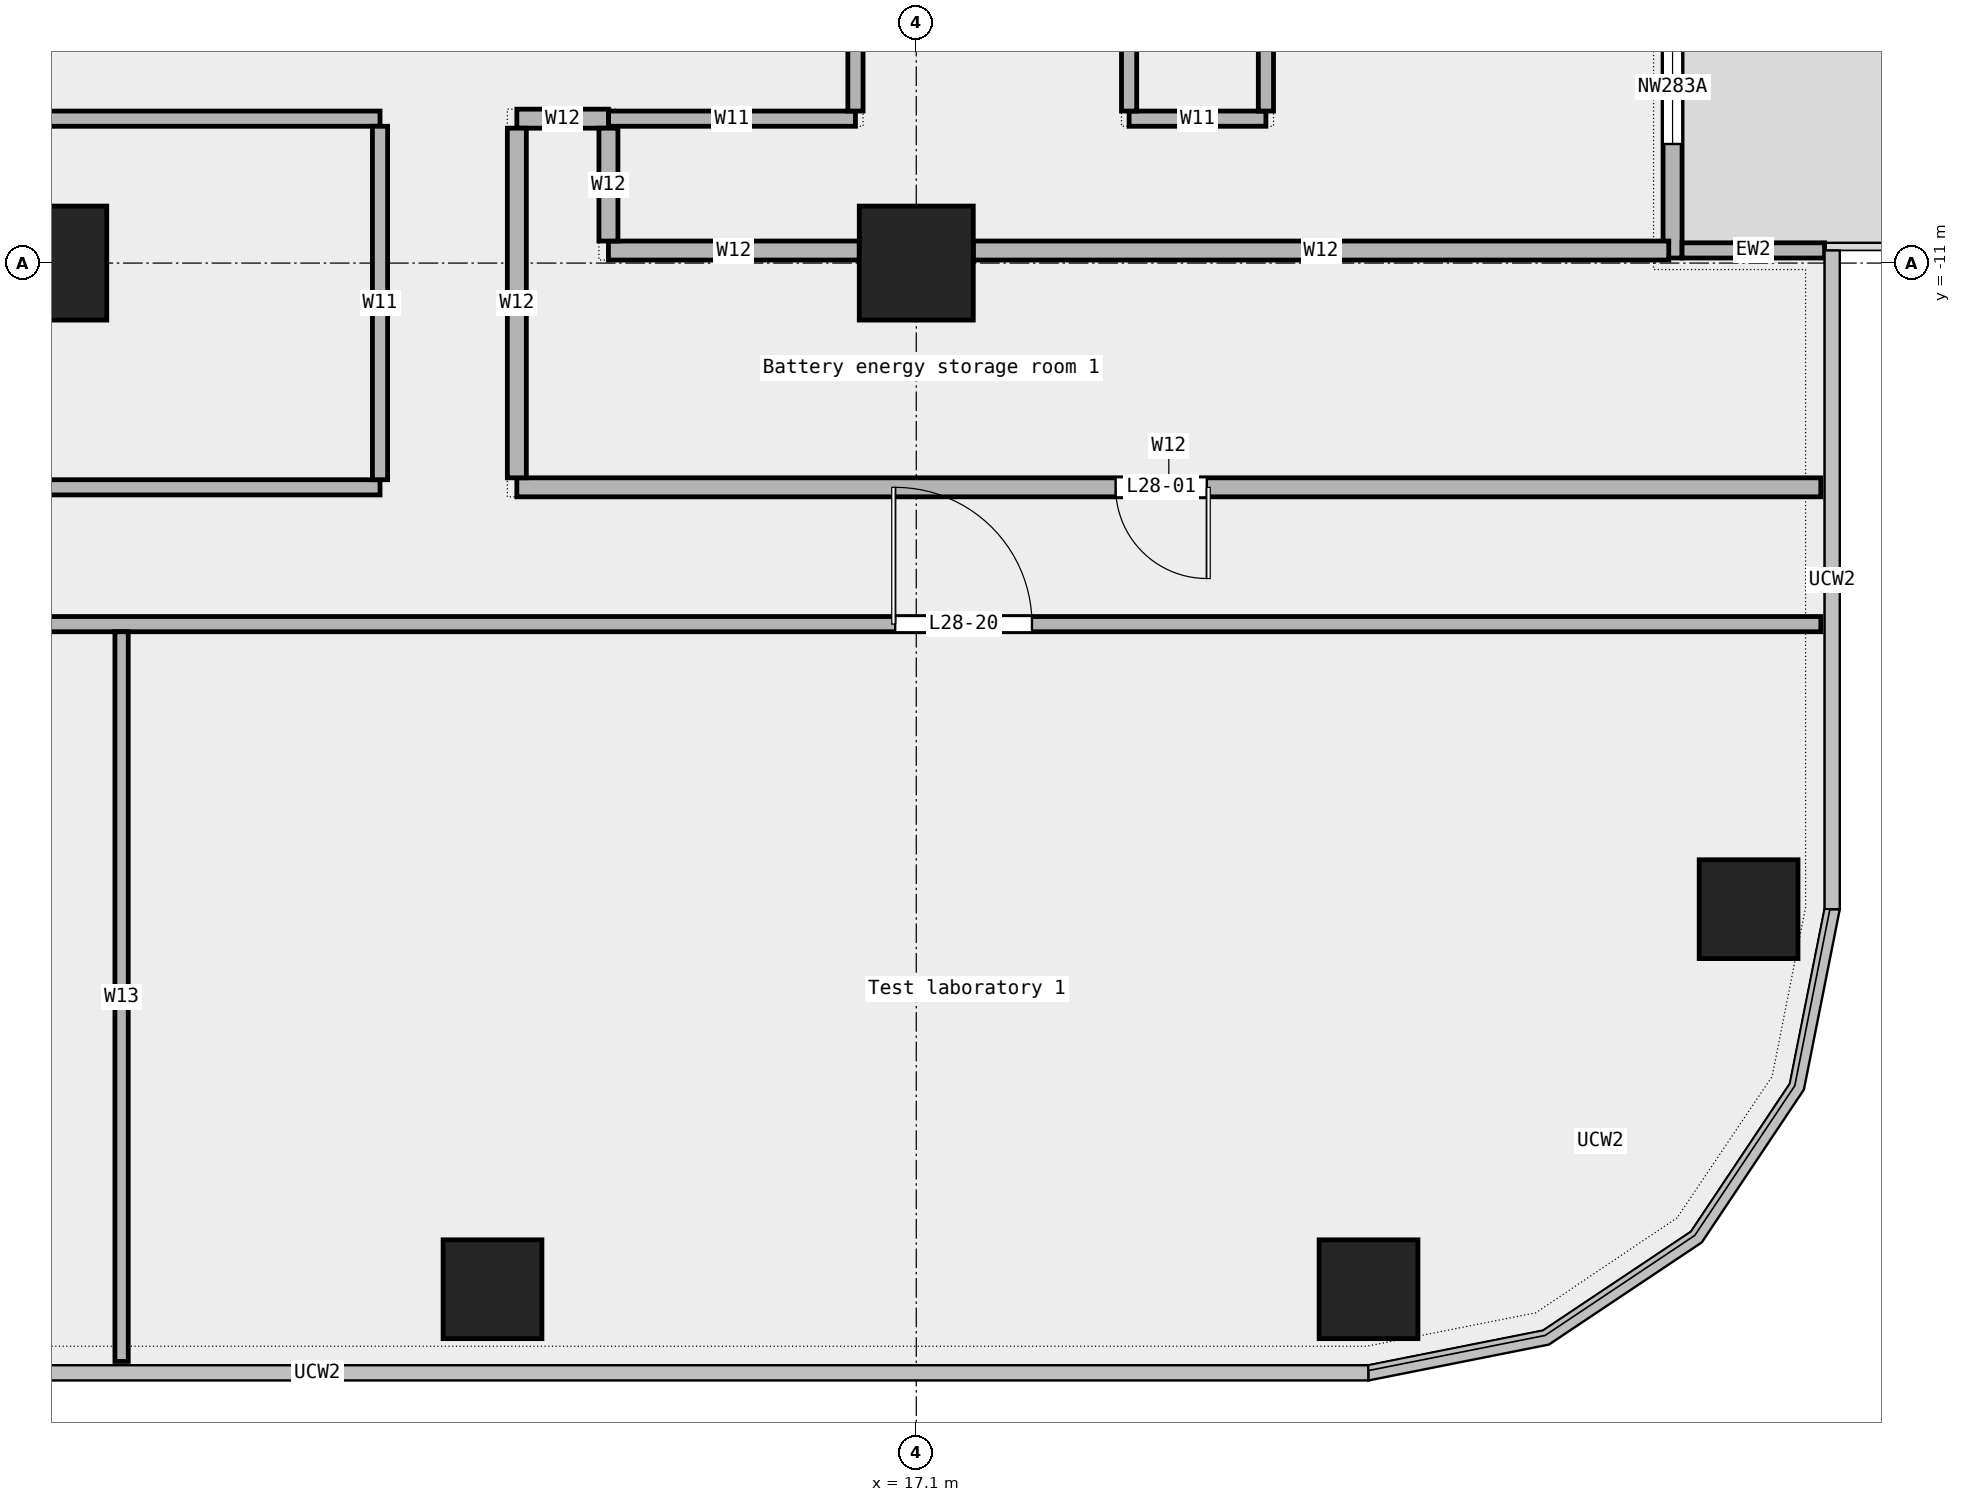
"""IFC4 building model, lengths in metres.
Left out: names, types, materials, properties, quantities, classifications, styles, units other than length and angle.
Written with IfcOpenShell. Run it as: python <this file> out.ifc"""

import sys

from ifc_helpers import new_model, si_unit, direction, frame, frame_2d, origin, origin_2d, place, context, subcontext, project, spatial, rectangle, extrude, element, fill, save


model = new_model("IFC4")
c1 = context("Model", 3, precision=1e-05, world=origin(), true_north=direction((0.0, 1.0)))
c2 = subcontext(c1, "Body", "Model", "MODEL_VIEW")
j1 = project(units=[si_unit("LENGTHUNIT", "METRE"), si_unit("PLANEANGLEUNIT", "RADIAN")], contexts=[c1])
p1 = place(None, origin())
s1 = spatial("IfcSite", under=j1, at=p1, CompositionType="ELEMENT")
p2 = place(p1, origin())
s2 = spatial("IfcBuilding", under=s1, at=p2, CompositionType="ELEMENT")
p3 = place(p2, frame((0.0, 0.0, 139.6)))
s3 = spatial("IfcBuildingStorey", under=s2, at=p3, CompositionType="ELEMENT", Elevation=139.6)
for number, where, z_axis, x_axis in (
    (1, (11.525, -24.5, 0.0), (0.0, 0.0, 1.0), (1.0, 0.0, 0.0)),
    (2, (23.05, -24.5, 0.0), (0.0, 0.0, 1.0), (1.0, 0.0, 0.0)),
    (3, (28.05, -19.5, 0.0), (0.0, 0.0, 1.0), (1.0, 0.0, 0.0)),
):
    element("IfcColumn", number, at=place(p3, frame(where, z_axis=z_axis, x_axis=x_axis)), inside=s3, PredefinedType="COLUMN", context=c2, shape_type="SweptSolid", body=[
        extrude(rectangle(XDim=1.3, YDim=1.3, at=origin_2d()), origin(), (0.0, 0.0, 1.0), 4.05),
    ])
for number, where, z_axis, x_axis in (
    (4, (5.7, -11.0, 0.0), (0.0, 0.0, 1.0), (1.0, 0.0, 0.0)),
    (5, (17.1, -11.0, 0.0), (0.0, 0.0, 1.0), (1.0, 0.0, 0.0)),
):
    element("IfcColumn", number, at=place(p3, frame(where, z_axis=z_axis, x_axis=x_axis)), inside=s3, PredefinedType="COLUMN", context=c2, shape_type="SweptSolid", body=[
        extrude(rectangle(XDim=1.5, YDim=1.5, at=origin_2d()), origin(), (0.0, 0.0, 1.0), 4.05),
    ])
p4 = place(p3, frame((27.05, -10.933, 0.0), z_axis=(0.0, 0.0, 1.0), x_axis=(0.0, 1.0, 0.0)))
e6 = element("IfcWall", 6, at=p4, inside=s3, PredefinedType="STANDARD", context=c2, shape_type="SweptSolid", body=[
    extrude(rectangle(XDim=13.2, YDim=0.25, at=frame_2d((6.6, 0.0))), origin(), (0.0, 0.0, 1.0), 4.05),
])
p5 = place(p4, frame((1.5, 0.0, 0.45)))
e7 = element("IfcOpeningElement", 7, at=p5, cuts=e6, PredefinedType="OPENING", context=c2, shape_type="SweptSolid", body=[
    extrude(rectangle(XDim=1.5, YDim=3.0, at=frame_2d((0.75, 1.5))), frame((0.0, 0.137, 0.0), z_axis=(0.0, -1.0, 0.0), x_axis=(1.0, 0.0, 0.0)), (0.0, 0.0, 1.0), 0.274),
])
p6 = place(p4, frame((5.75, 0.0, 0.0)))
e8 = element("IfcOpeningElement", 8, at=p6, cuts=e6, PredefinedType="OPENING", context=c2, shape_type="SweptSolid", body=[
    extrude(rectangle(XDim=1.8, YDim=2.4, at=frame_2d((0.9, 1.2))), frame((0.0, 0.137, 0.0), z_axis=(0.0, -1.0, 0.0), x_axis=(1.0, 0.0, 0.0)), (0.0, 0.0, 1.0), 0.274),
])
p7 = place(p4, frame((10.25, 0.0, 0.45)))
e9 = element("IfcOpeningElement", 9, at=p7, cuts=e6, PredefinedType="OPENING", context=c2, shape_type="SweptSolid", body=[
    extrude(rectangle(XDim=1.5, YDim=3.0, at=frame_2d((0.75, 1.5))), frame((0.0, 0.137, 0.0), z_axis=(0.0, -1.0, 0.0), x_axis=(1.0, 0.0, 0.0)), (0.0, 0.0, 1.0), 0.274),
])
p8 = place(p3, frame((29.05, -10.833, 0.0), z_axis=(0.0, 0.0, 1.0), x_axis=(-1.0, 0.0, 0.0)))
e10 = element("IfcWall", 10, at=p8, inside=s3, PredefinedType="STANDARD", context=c2, shape_type="SweptSolid", body=[
    extrude(rectangle(XDim=1.875, YDim=0.2, at=frame_2d((0.938, 0.0))), origin(), (0.0, 0.0, 1.0), 4.05),
])
p9 = place(p3, frame((-18.44, -15.75, 0.0), z_axis=(0.0, 0.0, 1.0), x_axis=(1.0, 0.0, 0.0)))
e11 = element("IfcWall", 11, at=p9, inside=s3, PredefinedType="PARTITIONING", context=c2, shape_type="SweptSolid", body=[
    extrude(rectangle(XDim=47.44, YDim=0.2, at=frame_2d((23.72, 0.0))), origin(), (0.0, 0.0, 1.0), 4.05),
])
p10 = place(p9, frame((18.708, 0.0, 0.0)))
e12 = element("IfcOpeningElement", 12, at=p10, cuts=e11, PredefinedType="OPENING", context=c2, shape_type="SweptSolid", body=[
    extrude(rectangle(XDim=1.5, YDim=2.1, at=frame_2d((0.75, 1.05))), frame((0.0, 0.112, 0.0), z_axis=(0.0, -1.0, 0.0), x_axis=(1.0, 0.0, 0.0)), (0.0, 0.0, 1.0), 0.224),
])
p11 = place(p9, frame((6.165, 0.0, 0.0)))
e13 = element("IfcOpeningElement", 13, at=p11, cuts=e11, PredefinedType="OPENING", context=c2, shape_type="SweptSolid", body=[
    extrude(rectangle(XDim=1.5, YDim=2.1, at=frame_2d((0.75, 1.05))), frame((0.0, 0.112, 0.0), z_axis=(0.0, -1.0, 0.0), x_axis=(1.0, 0.0, 0.0)), (0.0, 0.0, 1.0), 0.224),
])
p12 = place(p9, frame((35.262, 0.0, 0.0)))
e14 = element("IfcOpeningElement", 14, at=p12, cuts=e11, PredefinedType="OPENING", context=c2, shape_type="SweptSolid", body=[
    extrude(rectangle(XDim=1.8, YDim=2.1, at=frame_2d((0.9, 1.05))), frame((0.0, 0.112, 0.0), z_axis=(0.0, -1.0, 0.0), x_axis=(1.0, 0.0, 0.0)), (0.0, 0.0, 1.0), 0.224),
])
p13 = place(p3, frame((-2.42, -13.95, 0.0), z_axis=(0.0, 0.0, 1.0), x_axis=(1.0, 0.0, 0.0)))
e15 = element("IfcWall", 15, at=p13, inside=s3, PredefinedType="PARTITIONING", context=c2, shape_type="SweptSolid", body=[
    extrude(rectangle(XDim=12.465, YDim=0.2, at=frame_2d((6.232, 0.0))), origin(), (0.0, 0.0, 1.0), 4.05),
])
p14 = place(p3, frame((11.845, -13.95, 0.0), z_axis=(0.0, 0.0, 1.0), x_axis=(1.0, 0.0, 0.0)))
e16 = element("IfcWall", 16, at=p14, inside=s3, PredefinedType="PARTITIONING", context=c2, shape_type="SweptSolid", body=[
    extrude(rectangle(XDim=17.155, YDim=0.25, at=frame_2d((8.578, 0.0))), origin(), (0.0, 0.0, 1.0), 4.05),
])
p15 = place(p14, frame((7.877, 0.0, 0.0)))
e17 = element("IfcOpeningElement", 17, at=p15, cuts=e16, PredefinedType="OPENING", context=c2, shape_type="SweptSolid", body=[
    extrude(rectangle(XDim=1.2, YDim=2.1, at=frame_2d((0.6, 1.05))), frame((0.0, 0.137, 0.0), z_axis=(0.0, -1.0, 0.0), x_axis=(1.0, 0.0, 0.0)), (0.0, 0.0, 1.0), 0.274),
])
p16 = place(p3, frame((13.05, -10.835, 0.0), z_axis=(0.0, 0.0, 1.0), x_axis=(1.0, 0.0, 0.0)))
e18 = element("IfcWall", 18, at=p16, inside=s3, PredefinedType="PARTITIONING", context=c2, shape_type="SweptSolid", body=[
    extrude(rectangle(XDim=3.3, YDim=0.25, at=frame_2d((1.65, 0.0))), origin(), (0.0, 0.0, 1.0), 4.05),
])
p17 = place(p3, frame((17.85, -10.835, 0.0), z_axis=(0.0, 0.0, 1.0), x_axis=(1.0, 0.0, 0.0)))
e19 = element("IfcWall", 19, at=p17, inside=s3, PredefinedType="PARTITIONING", context=c2, shape_type="SweptSolid", body=[
    extrude(rectangle(XDim=9.15, YDim=0.25, at=frame_2d((4.575, 0.0))), origin(), (0.0, 0.0, 1.0), 4.05),
])
p18 = place(p3, frame((-2.42, -9.1, 0.0), z_axis=(0.0, 0.0, 1.0), x_axis=(1.0, 0.0, 0.0)))
e20 = element("IfcWall", 20, at=p18, inside=s3, PredefinedType="PARTITIONING", context=c2, shape_type="SweptSolid", body=[
    extrude(rectangle(XDim=12.465, YDim=0.2, at=frame_2d((6.232, 0.0))), origin(), (0.0, 0.0, 1.0), 4.05),
])
p19 = place(p18, frame((5.633, 0.0, 0.0)))
e21 = element("IfcOpeningElement", 21, at=p19, cuts=e20, PredefinedType="OPENING", context=c2, shape_type="SweptSolid", body=[
    extrude(rectangle(XDim=1.2, YDim=2.1, at=frame_2d((0.6, 1.05))), frame((0.0, 0.112, 0.0), z_axis=(0.0, -1.0, 0.0), x_axis=(1.0, 0.0, 0.0)), (0.0, 0.0, 1.0), 0.224),
])
p20 = place(p3, frame((13.05, -9.1, 0.0), z_axis=(0.0, 0.0, 1.0), x_axis=(1.0, 0.0, 0.0)))
e22 = element("IfcWall", 22, at=p20, inside=s3, PredefinedType="PARTITIONING", context=c2, shape_type="SweptSolid", body=[
    extrude(rectangle(XDim=3.25, YDim=0.2, at=frame_2d((1.625, 0.0))), origin(), (0.0, 0.0, 1.0), 4.05),
])
p21 = place(p3, frame((19.9, -9.1, 0.0), z_axis=(0.0, 0.0, 1.0), x_axis=(1.0, 0.0, 0.0)))
e23 = element("IfcWall", 23, at=p21, inside=s3, PredefinedType="PARTITIONING", context=c2, shape_type="SweptSolid", body=[
    extrude(rectangle(XDim=1.8, YDim=0.2, at=frame_2d((0.9, 0.0))), origin(), (0.0, 0.0, 1.0), 4.05),
])
p22 = place(p3, frame((11.845, -9.1, 0.0), z_axis=(0.0, 0.0, 1.0), x_axis=(1.0, 0.0, 0.0)))
e24 = element("IfcWall", 24, at=p22, inside=s3, PredefinedType="PARTITIONING", context=c2, shape_type="SweptSolid", body=[
    extrude(rectangle(XDim=1.205, YDim=0.25, at=frame_2d((0.603, 0.0))), origin(), (0.0, 0.0, 1.0), 4.05),
])
p23 = place(p3, frame((6.645, -25.45, 0.0), z_axis=(0.0, 0.0, 1.0), x_axis=(0.0, 1.0, 0.0)))
e25 = element("IfcWall", 25, at=p23, inside=s3, PredefinedType="PARTITIONING", context=c2, shape_type="SweptSolid", body=[
    extrude(rectangle(XDim=9.6, YDim=0.175, at=frame_2d((4.8, 0.0))), origin(), (0.0, 0.0, 1.0), 4.05),
])
p24 = place(p3, frame((10.045, -13.85, 0.0), z_axis=(0.0, 0.0, 1.0), x_axis=(0.0, 1.0, 0.0)))
e26 = element("IfcWall", 26, at=p24, inside=s3, PredefinedType="PARTITIONING", context=c2, shape_type="SweptSolid", body=[
    extrude(rectangle(XDim=4.65, YDim=0.2, at=frame_2d((2.325, 0.0))), origin(), (0.0, 0.0, 1.0), 4.05),
])
p25 = place(p3, frame((11.845, -13.825, 0.0), z_axis=(0.0, 0.0, 1.0), x_axis=(0.0, 1.0, 0.0)))
e27 = element("IfcWall", 27, at=p25, inside=s3, PredefinedType="PARTITIONING", context=c2, shape_type="SweptSolid", body=[
    extrude(rectangle(XDim=4.6, YDim=0.25, at=frame_2d((2.3, 0.0))), origin(), (0.0, 0.0, 1.0), 4.05),
])
p26 = place(p3, frame((13.05, -10.71, 0.0), z_axis=(0.0, 0.0, 1.0), x_axis=(0.0, 1.0, 0.0)))
e28 = element("IfcWall", 28, at=p26, inside=s3, PredefinedType="PARTITIONING", context=c2, shape_type="SweptSolid", body=[
    extrude(rectangle(XDim=1.485, YDim=0.25, at=frame_2d((0.742, 0.0))), origin(), (0.0, 0.0, 1.0), 4.05),
])
p27 = place(p3, frame((16.3, -9.0, 0.0), z_axis=(0.0, 0.0, 1.0), x_axis=(0.0, 1.0, 0.0)))
e29 = element("IfcWall", 29, at=p27, inside=s3, PredefinedType="PARTITIONING", context=c2, shape_type="SweptSolid", body=[
    extrude(rectangle(XDim=8.25, YDim=0.2, at=frame_2d((4.125, 0.0))), origin(), (0.0, 0.0, 1.0), 4.05),
])
p28 = place(p3, frame((19.9, -9.0, 0.0), z_axis=(0.0, 0.0, 1.0), x_axis=(0.0, 1.0, 0.0)))
e30 = element("IfcWall", 30, at=p28, inside=s3, PredefinedType="PARTITIONING", context=c2, shape_type="SweptSolid", body=[
    extrude(rectangle(XDim=9.95, YDim=0.2, at=frame_2d((4.975, 0.0))), origin(), (0.0, 0.0, 1.0), 4.05),
])
p29 = place(p3, frame((21.7, -9.0, 0.0), z_axis=(0.0, 0.0, 1.0), x_axis=(0.0, 1.0, 0.0)))
e31 = element("IfcWall", 31, at=p29, inside=s3, PredefinedType="PARTITIONING", context=c2, shape_type="SweptSolid", body=[
    extrude(rectangle(XDim=24.3, YDim=0.2, at=frame_2d((12.15, 0.0))), origin(), (0.0, 0.0, 1.0), 4.05),
])
p30 = place(p29, frame((18.645, 0.0, 0.0)))
e32 = element("IfcOpeningElement", 32, at=p30, cuts=e31, PredefinedType="OPENING", context=c2, shape_type="SweptSolid", body=[
    extrude(rectangle(XDim=1.2, YDim=2.1, at=frame_2d((0.6, 1.05))), frame((0.0, 0.112, 0.0), z_axis=(0.0, -1.0, 0.0), x_axis=(1.0, 0.0, 0.0)), (0.0, 0.0, 1.0), 0.224),
])
p31 = place(p29, frame((4.833, 0.0, 0.0)))
e33 = element("IfcOpeningElement", 33, at=p31, cuts=e31, PredefinedType="OPENING", context=c2, shape_type="SweptSolid", body=[
    extrude(rectangle(XDim=1.5, YDim=2.1, at=frame_2d((0.75, 1.05))), frame((0.0, 0.112, 0.0), z_axis=(0.0, -1.0, 0.0), x_axis=(1.0, 0.0, 0.0)), (0.0, 0.0, 1.0), 0.224),
])
p32 = place(p29, frame((12.228, 0.0, 0.0)))
e34 = element("IfcOpeningElement", 34, at=p32, cuts=e31, PredefinedType="OPENING", context=c2, shape_type="SweptSolid", body=[
    extrude(rectangle(XDim=0.9, YDim=2.1, at=frame_2d((0.45, 1.05))), frame((0.0, 0.112, 0.0), z_axis=(0.0, -1.0, 0.0), x_axis=(1.0, 0.0, 0.0)), (0.0, 0.0, 1.0), 0.224),
])
p33 = place(p5, origin())
e35 = element("IfcWindow", 35, at=p33, inside=s3, PartitioningType="SINGLE_PANEL", PredefinedType="WINDOW", context=c2, shape_type="SweptSolid", body=[
    extrude(rectangle(XDim=1.5, YDim=3.0, at=frame_2d((0.75, 1.5))), frame((0.0, 0.03, 0.0), z_axis=(0.0, -1.0, 0.0), x_axis=(1.0, 0.0, 0.0)), (0.0, 0.0, 1.0), 0.06),
])
fill(e7, e35)
p34 = place(p15, origin())
e36 = element("IfcDoor", 36, at=p34, inside=s3, OperationType="SINGLE_SWING_LEFT", PredefinedType="DOOR", context=c2, shape_type="SweptSolid", body=[
    extrude(rectangle(XDim=1.2, YDim=2.1, at=frame_2d((0.6, 1.05))), frame((0.0, 0.025, 0.0), z_axis=(0.0, -1.0, 0.0), x_axis=(1.0, 0.0, 0.0)), (0.0, 0.0, 1.0), 0.05),
])
fill(e17, e36)
p35 = place(p12, origin())
e37 = element("IfcDoor", 37, at=p35, inside=s3, OperationType="DOUBLE_DOOR_SINGLE_SWING", PredefinedType="DOOR", context=c2, shape_type="SweptSolid", body=[
    extrude(rectangle(XDim=1.8, YDim=2.1, at=frame_2d((0.9, 1.05))), frame((0.0, 0.025, 0.0), z_axis=(0.0, -1.0, 0.0), x_axis=(1.0, 0.0, 0.0)), (0.0, 0.0, 1.0), 0.05),
])
fill(e14, e37)
save(model, sys.argv[1])
